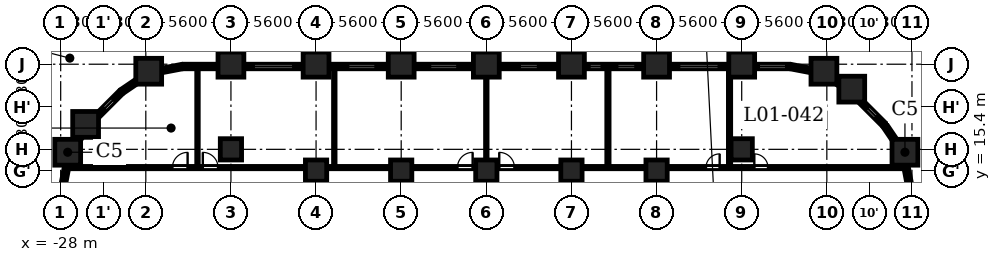
"""IFC4 building model, lengths in metres.
Left out: names, types, materials, properties, quantities, classifications, styles, units other than length and angle.
Written with IfcOpenShell. Run it as: python <this file> out.ifc"""

import sys

from ifc_helpers import new_model, si_unit, direction, frame, frame_2d, origin, origin_2d, place, context, subcontext, project, spatial, rectangle, extrude, element, fill, save


model = new_model("IFC4")
c1 = context("Model", 3, precision=1e-05, world=origin(), true_north=direction((0.0, 1.0)))
c2 = subcontext(c1, "Body", "Model", "MODEL_VIEW")
j1 = project(units=[si_unit("LENGTHUNIT", "METRE"), si_unit("PLANEANGLEUNIT", "RADIAN")], contexts=[c1])
p1 = place(None, origin())
s1 = spatial("IfcSite", under=j1, at=p1, CompositionType="ELEMENT")
p2 = place(p1, origin())
s2 = spatial("IfcBuilding", under=s1, at=p2, CompositionType="ELEMENT")
p3 = place(p2, frame((0.0, 0.0, 6.5)))
s3 = spatial("IfcBuildingStorey", under=s2, at=p3, CompositionType="ELEMENT", Elevation=6.5)
for number, where, z_axis, x_axis in (
    (1, (27.538, 16.609, 0.0), (0.0, 0.0, 1.0), (1.0, 0.0, 0.0)),
    (2, (24.04, 20.76, 0.0), (0.0, 0.0, 1.0), (1.0, 0.0, 0.0)),
    (3, (22.209, 21.938, 0.0), (0.0, 0.0, 1.0), (1.0, 0.0, 0.0)),
    (4, (16.8, 22.4, 0.0), (0.0, 0.0, 1.0), (1.0, 0.0, 0.0)),
    (5, (11.2, 22.4, 0.0), (0.0, 0.0, 1.0), (1.0, 0.0, 0.0)),
    (6, (5.6, 22.4, 0.0), (0.0, 0.0, 1.0), (1.0, 0.0, 0.0)),
    (7, (0.0, 22.4, 0.0), (0.0, 0.0, 1.0), (1.0, 0.0, 0.0)),
    (8, (-5.6, 22.4, 0.0), (0.0, 0.0, 1.0), (1.0, 0.0, 0.0)),
    (9, (-11.2, 22.4, 0.0), (0.0, 0.0, 1.0), (1.0, 0.0, 0.0)),
    (10, (-16.8, 22.4, 0.0), (0.0, 0.0, 1.0), (1.0, 0.0, 0.0)),
    (11, (-22.209, 21.938, 0.0), (0.0, 0.0, 1.0), (1.0, 0.0, 0.0)),
    (12, (-26.36, 18.44, 0.0), (0.0, 0.0, 1.0), (1.0, 0.0, 0.0)),
    (13, (-27.538, 16.609, 0.0), (0.0, 0.0, 1.0), (1.0, 0.0, 0.0)),
):
    element("IfcColumn", number, at=place(p3, frame(where, z_axis=z_axis, x_axis=x_axis)), inside=s3, PredefinedType="COLUMN", context=c2, shape_type="SweptSolid", body=[
        extrude(rectangle(XDim=1.7, YDim=1.7, at=origin_2d()), origin(), (0.0, 0.0, 1.0), 4.8),
    ])
for number, where, z_axis, x_axis in (
    (14, (-16.8, 16.8, 0.0), (0.0, 0.0, 1.0), (1.0, 0.0, 0.0)),
    (15, (16.8, 16.8, 0.0), (0.0, 0.0, 1.0), (1.0, 0.0, 0.0)),
    (16, (-11.2, 15.4, 0.0), (0.0, 0.0, 1.0), (1.0, 0.0, 0.0)),
    (17, (-5.6, 15.4, 0.0), (0.0, 0.0, 1.0), (1.0, 0.0, 0.0)),
    (18, (0.0, 15.4, 0.0), (0.0, 0.0, 1.0), (1.0, 0.0, 0.0)),
    (19, (5.6, 15.4, 0.0), (0.0, 0.0, 1.0), (1.0, 0.0, 0.0)),
    (20, (11.2, 15.4, 0.0), (0.0, 0.0, 1.0), (1.0, 0.0, 0.0)),
):
    element("IfcColumn", number, at=place(p3, frame(where, z_axis=z_axis, x_axis=x_axis)), inside=s3, PredefinedType="COLUMN", context=c2, shape_type="SweptSolid", body=[
        extrude(rectangle(XDim=1.4, YDim=1.4, at=origin_2d()), origin(), (0.0, 0.0, 1.0), 4.8),
    ])
for number, where, z_axis, x_axis in (
    (21, (27.853, 14.372, 0.0), (0.0, 0.0, 1.0), (-0.187, 0.982, 0.0)),
    (22, (26.969, 17.25, 0.0), (0.0, 0.0, 1.0), (-0.562, 0.827, 0.0)),
):
    element("IfcWall", number, at=place(p3, frame(where, z_axis=z_axis, x_axis=x_axis)), inside=s3, PredefinedType="SOLIDWALL", context=c2, shape_type="SweptSolid", body=[
        extrude(rectangle(XDim=1.406, YDim=0.3, at=frame_2d((0.703, 0.0))), origin(), (0.0, 0.0, 1.0), 3.55),
    ])
p4 = place(p3, frame((26.197, 18.391, 0.0), z_axis=(0.0, 0.0, 1.0), x_axis=(-0.707054835785, 0.707158722772, 0.0)))
e23 = element("IfcWall", 23, at=p4, inside=s3, PredefinedType="SOLIDWALL", context=c2, shape_type="SweptSolid", body=[
    extrude(rectangle(XDim=2.35, YDim=0.3, at=frame_2d((1.175, 0.0))), origin(), (0.0, 0.0, 1.0), 3.55),
])
p5 = place(p4, frame((0.775, 0.0, 0.6)))
e24 = element("IfcOpeningElement", 24, at=p5, cuts=e23, PredefinedType="OPENING", context=c2, shape_type="SweptSolid", body=[
    extrude(rectangle(XDim=0.8, YDim=1.55, at=frame_2d((0.4, 0.775))), frame((0.0, 0.16, 0.0), z_axis=(0.0, -1.0, 0.0), x_axis=(1.0, 0.0, 0.0)), (0.0, 0.0, 1.0), 0.32),
])
p6 = place(p3, frame((23.244, 21.101, 0.0), z_axis=(0.0, 0.0, 1.0), x_axis=(-0.827135885329, 0.562001981492, 0.0)))
e25 = element("IfcWall", 25, at=p6, inside=s3, PredefinedType="SOLIDWALL", context=c2, shape_type="SweptSolid", body=[
    extrude(rectangle(XDim=0.477, YDim=0.3, at=frame_2d((0.239, 0.0))), origin(), (0.0, 0.0, 1.0), 4.45),
])
p7 = place(p3, frame((21.353, 21.989, 0.0), z_axis=(0.0, 0.0, 1.0), x_axis=(-0.98229142023, 0.187359455971, 0.0)))
e26 = element("IfcWall", 26, at=p7, inside=s3, PredefinedType="SOLIDWALL", context=c2, shape_type="SweptSolid", body=[
    extrude(rectangle(XDim=1.406, YDim=0.3, at=frame_2d((0.703, 0.0))), origin(), (0.0, 0.0, 1.0), 3.55),
])
p8 = place(p3, frame((20.0, 22.25, 0.0), z_axis=(0.0, 0.0, 1.0), x_axis=(-1.0, 0.0, 0.0)))
e27 = element("IfcWall", 27, at=p8, inside=s3, PredefinedType="SOLIDWALL", context=c2, shape_type="SweptSolid", body=[
    extrude(rectangle(XDim=2.35, YDim=0.3, at=frame_2d((1.175, 0.0))), origin(), (0.0, 0.0, 1.0), 3.55),
])
p9 = place(p8, frame((0.275, 0.0, 0.9)))
e28 = element("IfcOpeningElement", 28, at=p9, cuts=e27, PredefinedType="OPENING", context=c2, shape_type="SweptSolid", body=[
    extrude(rectangle(XDim=1.8, YDim=1.25, at=frame_2d((0.9, 0.625))), frame((0.0, 0.16, 0.0), z_axis=(0.0, -1.0, 0.0), x_axis=(1.0, 0.0, 0.0)), (0.0, 0.0, 1.0), 0.32),
])
p10 = place(p3, frame((15.95, 22.25, 0.0), z_axis=(0.0, 0.0, 1.0), x_axis=(-1.0, 0.0, 0.0)))
e29 = element("IfcWall", 29, at=p10, inside=s3, PredefinedType="SOLIDWALL", context=c2, shape_type="SweptSolid", body=[
    extrude(rectangle(XDim=3.9, YDim=0.3, at=frame_2d((1.95, 0.0))), origin(), (0.0, 0.0, 1.0), 3.55),
])
p11 = place(p10, frame((0.663, 0.0, 0.9)))
e30 = element("IfcOpeningElement", 30, at=p11, cuts=e29, PredefinedType="OPENING", context=c2, shape_type="SweptSolid", body=[
    extrude(rectangle(XDim=2.6, YDim=1.25, at=frame_2d((1.3, 0.625))), frame((0.0, 0.16, 0.0), z_axis=(0.0, -1.0, 0.0), x_axis=(1.0, 0.0, 0.0)), (0.0, 0.0, 1.0), 0.32),
])
p12 = place(p3, frame((10.35, 22.25, 0.0), z_axis=(0.0, 0.0, 1.0), x_axis=(-1.0, 0.0, 0.0)))
e31 = element("IfcWall", 31, at=p12, inside=s3, PredefinedType="SOLIDWALL", context=c2, shape_type="SweptSolid", body=[
    extrude(rectangle(XDim=3.9, YDim=0.3, at=frame_2d((1.95, 0.0))), origin(), (0.0, 0.0, 1.0), 3.55),
])
p13 = place(p12, frame((0.538, 0.0, 0.6)))
e32 = element("IfcOpeningElement", 32, at=p13, cuts=e31, PredefinedType="OPENING", context=c2, shape_type="SweptSolid", body=[
    extrude(rectangle(XDim=1.2, YDim=1.55, at=frame_2d((0.6, 0.775))), frame((0.0, 0.16, 0.0), z_axis=(0.0, -1.0, 0.0), x_axis=(1.0, 0.0, 0.0)), (0.0, 0.0, 1.0), 0.32),
])
p14 = place(p12, frame((2.762, 0.0, 0.6)))
e33 = element("IfcOpeningElement", 33, at=p14, cuts=e31, PredefinedType="OPENING", context=c2, shape_type="SweptSolid", body=[
    extrude(rectangle(XDim=0.8, YDim=1.55, at=frame_2d((0.4, 0.775))), frame((0.0, 0.16, 0.0), z_axis=(0.0, -1.0, 0.0), x_axis=(1.0, 0.0, 0.0)), (0.0, 0.0, 1.0), 0.32),
])
p15 = place(p3, frame((4.75, 22.25, 0.0), z_axis=(0.0, 0.0, 1.0), x_axis=(-1.0, 0.0, 0.0)))
e34 = element("IfcWall", 34, at=p15, inside=s3, PredefinedType="SOLIDWALL", context=c2, shape_type="SweptSolid", body=[
    extrude(rectangle(XDim=3.9, YDim=0.3, at=frame_2d((1.95, 0.0))), origin(), (0.0, 0.0, 1.0), 3.55),
])
p16 = place(p15, frame((1.35, 0.0, 0.6)))
e35 = element("IfcOpeningElement", 35, at=p16, cuts=e34, PredefinedType="OPENING", context=c2, shape_type="SweptSolid", body=[
    extrude(rectangle(XDim=1.2, YDim=1.55, at=frame_2d((0.6, 0.775))), frame((0.0, 0.16, 0.0), z_axis=(0.0, -1.0, 0.0), x_axis=(1.0, 0.0, 0.0)), (0.0, 0.0, 1.0), 0.32),
])
p17 = place(p3, frame((-0.85, 22.25, 0.0), z_axis=(0.0, 0.0, 1.0), x_axis=(-1.0, 0.0, 0.0)))
e36 = element("IfcWall", 36, at=p17, inside=s3, PredefinedType="SOLIDWALL", context=c2, shape_type="SweptSolid", body=[
    extrude(rectangle(XDim=3.9, YDim=0.3, at=frame_2d((1.95, 0.0))), origin(), (0.0, 0.0, 1.0), 3.55),
])
p18 = place(p17, frame((1.05, 0.0, 0.9)))
e37 = element("IfcOpeningElement", 37, at=p18, cuts=e36, PredefinedType="OPENING", context=c2, shape_type="SweptSolid", body=[
    extrude(rectangle(XDim=1.8, YDim=1.25, at=frame_2d((0.9, 0.625))), frame((0.0, 0.16, 0.0), z_axis=(0.0, -1.0, 0.0), x_axis=(1.0, 0.0, 0.0)), (0.0, 0.0, 1.0), 0.32),
])
p19 = place(p3, frame((-6.45, 22.25, 0.0), z_axis=(0.0, 0.0, 1.0), x_axis=(-1.0, 0.0, 0.0)))
e38 = element("IfcWall", 38, at=p19, inside=s3, PredefinedType="SOLIDWALL", context=c2, shape_type="SweptSolid", body=[
    extrude(rectangle(XDim=3.9, YDim=0.3, at=frame_2d((1.95, 0.0))), origin(), (0.0, 0.0, 1.0), 3.55),
])
p20 = place(p19, frame((0.837, 0.0, 0.9)))
e39 = element("IfcOpeningElement", 39, at=p20, cuts=e38, PredefinedType="OPENING", context=c2, shape_type="SweptSolid", body=[
    extrude(rectangle(XDim=1.8, YDim=1.25, at=frame_2d((0.9, 0.625))), frame((0.0, 0.16, 0.0), z_axis=(0.0, -1.0, 0.0), x_axis=(1.0, 0.0, 0.0)), (0.0, 0.0, 1.0), 0.32),
])
p21 = place(p3, frame((-12.05, 22.25, 0.0), z_axis=(0.0, 0.0, 1.0), x_axis=(-1.0, 0.0, 0.0)))
e40 = element("IfcWall", 40, at=p21, inside=s3, PredefinedType="SOLIDWALL", context=c2, shape_type="SweptSolid", body=[
    extrude(rectangle(XDim=3.9, YDim=0.3, at=frame_2d((1.95, 0.0))), origin(), (0.0, 0.0, 1.0), 3.55),
])
p22 = place(p21, frame((0.65, 0.0, 0.9)))
e41 = element("IfcOpeningElement", 41, at=p22, cuts=e40, PredefinedType="OPENING", context=c2, shape_type="SweptSolid", body=[
    extrude(rectangle(XDim=2.6, YDim=1.25, at=frame_2d((1.3, 0.625))), frame((0.0, 0.16, 0.0), z_axis=(0.0, -1.0, 0.0), x_axis=(1.0, 0.0, 0.0)), (0.0, 0.0, 1.0), 0.32),
])
p23 = place(p3, frame((-17.65, 22.25, 0.0), z_axis=(0.0, 0.0, 1.0), x_axis=(-1.0, 0.0, 0.0)))
e42 = element("IfcWall", 42, at=p23, inside=s3, PredefinedType="SOLIDWALL", context=c2, shape_type="SweptSolid", body=[
    extrude(rectangle(XDim=2.35, YDim=0.3, at=frame_2d((1.175, 0.0))), origin(), (0.0, 0.0, 1.0), 3.55),
])
for number, where, z_axis, x_axis in (
    (43, (-19.972, 22.253, 0.0), (0.0, 0.0, 1.0), (-0.982, -0.187, 0.0)),
    (44, (-22.85, 21.369, 0.0), (0.0, 0.0, 1.0), (-0.827, -0.562, 0.0)),
):
    element("IfcWall", number, at=place(p3, frame(where, z_axis=z_axis, x_axis=x_axis)), inside=s3, PredefinedType="SOLIDWALL", context=c2, shape_type="SweptSolid", body=[
        extrude(rectangle(XDim=1.406, YDim=0.3, at=frame_2d((0.703, 0.0))), origin(), (0.0, 0.0, 1.0), 3.55),
    ])
p24 = place(p3, frame((-23.991, 20.597, 0.0), z_axis=(0.0, 0.0, 1.0), x_axis=(-0.707054835785, -0.707158722772, 0.0)))
e45 = element("IfcWall", 45, at=p24, inside=s3, PredefinedType="SOLIDWALL", context=c2, shape_type="SweptSolid", body=[
    extrude(rectangle(XDim=2.35, YDim=0.3, at=frame_2d((1.175, 0.0))), origin(), (0.0, 0.0, 1.0), 3.55),
])
p25 = place(p24, frame((0.775, 0.0, 0.6)))
e46 = element("IfcOpeningElement", 46, at=p25, cuts=e45, PredefinedType="OPENING", context=c2, shape_type="SweptSolid", body=[
    extrude(rectangle(XDim=0.8, YDim=1.55, at=frame_2d((0.4, 0.775))), frame((0.0, 0.16, 0.0), z_axis=(0.0, -1.0, 0.0), x_axis=(1.0, 0.0, 0.0)), (0.0, 0.0, 1.0), 0.32),
])
p26 = place(p3, frame((-26.701, 17.644, 0.0), z_axis=(0.0, 0.0, 1.0), x_axis=(-0.562001981492, -0.827135885329, 0.0)))
e47 = element("IfcWall", 47, at=p26, inside=s3, PredefinedType="SOLIDWALL", context=c2, shape_type="SweptSolid", body=[
    extrude(rectangle(XDim=0.477, YDim=0.3, at=frame_2d((0.239, 0.0))), origin(), (0.0, 0.0, 1.0), 4.45),
])
p27 = place(p3, frame((-27.589, 15.753, 0.0), z_axis=(0.0, 0.0, 1.0), x_axis=(-0.187327504018, -0.982297514116, 0.0)))
e48 = element("IfcWall", 48, at=p27, inside=s3, PredefinedType="SOLIDWALL", context=c2, shape_type="SweptSolid", body=[
    extrude(rectangle(XDim=1.406, YDim=0.3, at=frame_2d((0.703, 0.0))), origin(), (0.0, 0.0, 1.0), 3.55),
])
p28 = place(p3, frame((-27.446, 15.6, 0.0), z_axis=(0.0, 0.0, 1.0), x_axis=(1.0, 0.0, 0.0)))
e49 = element("IfcWall", 49, at=p28, inside=s3, PredefinedType="PARTITIONING", context=c2, shape_type="SweptSolid", body=[
    extrude(rectangle(XDim=54.892, YDim=0.15, at=frame_2d((27.446, 0.0))), origin(), (0.0, 0.0, 1.0), 4.45),
])
p29 = place(p28, frame((6.796, 0.0, 0.0)))
e50 = element("IfcOpeningElement", 50, at=p29, cuts=e49, PredefinedType="OPENING", context=c2, shape_type="SweptSolid", body=[
    extrude(rectangle(XDim=1.0, YDim=2.1, at=frame_2d((0.5, 1.05))), frame((0.0, 0.085, 0.0), z_axis=(0.0, -1.0, 0.0), x_axis=(1.0, 0.0, 0.0)), (0.0, 0.0, 1.0), 0.17),
])
p30 = place(p28, frame((8.796, 0.0, 0.0)))
e51 = element("IfcOpeningElement", 51, at=p30, cuts=e49, PredefinedType="OPENING", context=c2, shape_type="SweptSolid", body=[
    extrude(rectangle(XDim=1.0, YDim=2.1, at=frame_2d((0.5, 1.05))), frame((0.0, 0.085, 0.0), z_axis=(0.0, -1.0, 0.0), x_axis=(1.0, 0.0, 0.0)), (0.0, 0.0, 1.0), 0.17),
])
p31 = place(p28, frame((25.546, 0.0, 0.0)))
e52 = element("IfcOpeningElement", 52, at=p31, cuts=e49, PredefinedType="OPENING", context=c2, shape_type="SweptSolid", body=[
    extrude(rectangle(XDim=1.0, YDim=2.1, at=frame_2d((0.5, 1.05))), frame((0.0, 0.085, 0.0), z_axis=(0.0, -1.0, 0.0), x_axis=(1.0, 0.0, 0.0)), (0.0, 0.0, 1.0), 0.17),
])
p32 = place(p28, frame((28.296, 0.0, 0.0)))
e53 = element("IfcOpeningElement", 53, at=p32, cuts=e49, PredefinedType="OPENING", context=c2, shape_type="SweptSolid", body=[
    extrude(rectangle(XDim=1.0, YDim=2.1, at=frame_2d((0.5, 1.05))), frame((0.0, 0.085, 0.0), z_axis=(0.0, -1.0, 0.0), x_axis=(1.0, 0.0, 0.0)), (0.0, 0.0, 1.0), 0.17),
])
p33 = place(p28, frame((41.896, 0.0, 0.0)))
e54 = element("IfcOpeningElement", 54, at=p33, cuts=e49, PredefinedType="OPENING", context=c2, shape_type="SweptSolid", body=[
    extrude(rectangle(XDim=0.9, YDim=2.1, at=frame_2d((0.45, 1.05))), frame((0.0, 0.085, 0.0), z_axis=(0.0, -1.0, 0.0), x_axis=(1.0, 0.0, 0.0)), (0.0, 0.0, 1.0), 0.17),
])
p34 = place(p28, frame((45.075, 0.0, 0.0)))
e55 = element("IfcOpeningElement", 55, at=p34, cuts=e49, PredefinedType="OPENING", context=c2, shape_type="SweptSolid", body=[
    extrude(rectangle(XDim=0.9, YDim=2.1, at=frame_2d((0.45, 1.05))), frame((0.0, 0.085, 0.0), z_axis=(0.0, -1.0, 0.0), x_axis=(1.0, 0.0, 0.0)), (0.0, 0.0, 1.0), 0.17),
])
for number, where, z_axis, x_axis in (
    (56, (-19.0, 15.675, 0.0), (0.0, 0.0, 1.0), (0.0, 1.0, 0.0)),
    (57, (-10.0, 15.675, 0.0), (0.0, 0.0, 1.0), (0.0, 1.0, 0.0)),
):
    element("IfcWall", number, at=place(p3, frame(where, z_axis=z_axis, x_axis=x_axis)), inside=s3, PredefinedType="PARTITIONING", context=c2, shape_type="SweptSolid", body=[
        extrude(rectangle(XDim=6.405, YDim=0.1, at=frame_2d((3.203, 0.0))), origin(), (0.0, 0.0, 1.0), 4.45),
    ])
p35 = place(p3, frame((0.0, 15.675, 0.0), z_axis=(0.0, 0.0, 1.0), x_axis=(0.0, 1.0, 0.0)))
e58 = element("IfcWall", 58, at=p35, inside=s3, PredefinedType="PARTITIONING", context=c2, shape_type="SweptSolid", body=[
    extrude(rectangle(XDim=6.635, YDim=0.1, at=frame_2d((3.317, 0.0))), origin(), (0.0, 0.0, 1.0), 4.45),
])
p36 = place(p3, frame((8.0, 15.675, 0.0), z_axis=(0.0, 0.0, 1.0), x_axis=(0.0, 1.0, 0.0)))
e59 = element("IfcWall", 59, at=p36, inside=s3, PredefinedType="PARTITIONING", context=c2, shape_type="SweptSolid", body=[
    extrude(rectangle(XDim=6.405, YDim=0.15, at=frame_2d((3.203, 0.0))), origin(), (0.0, 0.0, 1.0), 4.45),
])
p37 = place(p3, frame((16.0, 15.675, 0.0), z_axis=(0.0, 0.0, 1.0), x_axis=(0.0, 1.0, 0.0)))
e60 = element("IfcWall", 60, at=p37, inside=s3, PredefinedType="PARTITIONING", context=c2, shape_type="SweptSolid", body=[
    extrude(rectangle(XDim=6.635, YDim=0.15, at=frame_2d((3.317, 0.0))), origin(), (0.0, 0.0, 1.0), 4.45),
])
p38 = place(p29, origin())
e61 = element("IfcDoor", 61, at=p38, inside=s3, OperationType="SINGLE_SWING_LEFT", PredefinedType="DOOR", context=c2, shape_type="SweptSolid", body=[
    extrude(rectangle(XDim=1.0, YDim=2.1, at=frame_2d((0.5, 1.05))), frame((0.0, 0.025, 0.0), z_axis=(0.0, -1.0, 0.0), x_axis=(1.0, 0.0, 0.0)), (0.0, 0.0, 1.0), 0.05),
])
fill(e50, e61)
p39 = place(p30, origin())
e62 = element("IfcDoor", 62, at=p39, inside=s3, OperationType="SINGLE_SWING_RIGHT", PredefinedType="DOOR", context=c2, shape_type="SweptSolid", body=[
    extrude(rectangle(XDim=1.0, YDim=2.1, at=frame_2d((0.5, 1.05))), frame((0.0, 0.025, 0.0), z_axis=(0.0, -1.0, 0.0), x_axis=(1.0, 0.0, 0.0)), (0.0, 0.0, 1.0), 0.05),
])
fill(e51, e62)
p40 = place(p31, origin())
e63 = element("IfcDoor", 63, at=p40, inside=s3, OperationType="SINGLE_SWING_LEFT", PredefinedType="DOOR", context=c2, shape_type="SweptSolid", body=[
    extrude(rectangle(XDim=1.0, YDim=2.1, at=frame_2d((0.5, 1.05))), frame((0.0, 0.025, 0.0), z_axis=(0.0, -1.0, 0.0), x_axis=(1.0, 0.0, 0.0)), (0.0, 0.0, 1.0), 0.05),
])
fill(e52, e63)
p41 = place(p32, origin())
e64 = element("IfcDoor", 64, at=p41, inside=s3, OperationType="SINGLE_SWING_RIGHT", PredefinedType="DOOR", context=c2, shape_type="SweptSolid", body=[
    extrude(rectangle(XDim=1.0, YDim=2.1, at=frame_2d((0.5, 1.05))), frame((0.0, 0.025, 0.0), z_axis=(0.0, -1.0, 0.0), x_axis=(1.0, 0.0, 0.0)), (0.0, 0.0, 1.0), 0.05),
])
fill(e53, e64)
p42 = place(p33, origin())
e65 = element("IfcDoor", 65, at=p42, inside=s3, OperationType="SINGLE_SWING_LEFT", PredefinedType="DOOR", context=c2, shape_type="SweptSolid", body=[
    extrude(rectangle(XDim=0.9, YDim=2.1, at=frame_2d((0.45, 1.05))), frame((0.0, 0.025, 0.0), z_axis=(0.0, -1.0, 0.0), x_axis=(1.0, 0.0, 0.0)), (0.0, 0.0, 1.0), 0.05),
])
fill(e54, e65)
p43 = place(p34, origin())
e66 = element("IfcDoor", 66, at=p43, inside=s3, OperationType="SINGLE_SWING_RIGHT", PredefinedType="DOOR", context=c2, shape_type="SweptSolid", body=[
    extrude(rectangle(XDim=0.9, YDim=2.1, at=frame_2d((0.45, 1.05))), frame((0.0, 0.025, 0.0), z_axis=(0.0, -1.0, 0.0), x_axis=(1.0, 0.0, 0.0)), (0.0, 0.0, 1.0), 0.05),
])
fill(e55, e66)
p44 = place(p5, origin())
e67 = element("IfcWindow", 67, at=p44, inside=s3, PartitioningType="SINGLE_PANEL", PredefinedType="WINDOW", context=c2, shape_type="SweptSolid", body=[
    extrude(rectangle(XDim=0.8, YDim=1.55, at=frame_2d((0.4, 0.775))), frame((0.0, 0.03, 0.0), z_axis=(0.0, -1.0, 0.0), x_axis=(1.0, 0.0, 0.0)), (0.0, 0.0, 1.0), 0.06),
])
fill(e24, e67)
p45 = place(p9, origin())
e68 = element("IfcWindow", 68, at=p45, inside=s3, PartitioningType="SINGLE_PANEL", PredefinedType="WINDOW", context=c2, shape_type="SweptSolid", body=[
    extrude(rectangle(XDim=1.8, YDim=1.25, at=frame_2d((0.9, 0.625))), frame((0.0, 0.03, 0.0), z_axis=(0.0, -1.0, 0.0), x_axis=(1.0, 0.0, 0.0)), (0.0, 0.0, 1.0), 0.06),
])
fill(e28, e68)
p46 = place(p11, origin())
e69 = element("IfcWindow", 69, at=p46, inside=s3, PartitioningType="SINGLE_PANEL", PredefinedType="WINDOW", context=c2, shape_type="SweptSolid", body=[
    extrude(rectangle(XDim=2.6, YDim=1.25, at=frame_2d((1.3, 0.625))), frame((0.0, 0.03, 0.0), z_axis=(0.0, -1.0, 0.0), x_axis=(1.0, 0.0, 0.0)), (0.0, 0.0, 1.0), 0.06),
])
fill(e30, e69)
p47 = place(p13, origin())
e70 = element("IfcWindow", 70, at=p47, inside=s3, PartitioningType="SINGLE_PANEL", PredefinedType="WINDOW", context=c2, shape_type="SweptSolid", body=[
    extrude(rectangle(XDim=1.2, YDim=1.55, at=frame_2d((0.6, 0.775))), frame((0.0, 0.03, 0.0), z_axis=(0.0, -1.0, 0.0), x_axis=(1.0, 0.0, 0.0)), (0.0, 0.0, 1.0), 0.06),
])
fill(e32, e70)
p48 = place(p14, origin())
e71 = element("IfcWindow", 71, at=p48, inside=s3, PartitioningType="SINGLE_PANEL", PredefinedType="WINDOW", context=c2, shape_type="SweptSolid", body=[
    extrude(rectangle(XDim=0.8, YDim=1.55, at=frame_2d((0.4, 0.775))), frame((0.0, 0.03, 0.0), z_axis=(0.0, -1.0, 0.0), x_axis=(1.0, 0.0, 0.0)), (0.0, 0.0, 1.0), 0.06),
])
fill(e33, e71)
p49 = place(p16, origin())
e72 = element("IfcWindow", 72, at=p49, inside=s3, PartitioningType="SINGLE_PANEL", PredefinedType="WINDOW", context=c2, shape_type="SweptSolid", body=[
    extrude(rectangle(XDim=1.2, YDim=1.55, at=frame_2d((0.6, 0.775))), frame((0.0, 0.03, 0.0), z_axis=(0.0, -1.0, 0.0), x_axis=(1.0, 0.0, 0.0)), (0.0, 0.0, 1.0), 0.06),
])
fill(e35, e72)
p50 = place(p18, origin())
e73 = element("IfcWindow", 73, at=p50, inside=s3, PartitioningType="SINGLE_PANEL", PredefinedType="WINDOW", context=c2, shape_type="SweptSolid", body=[
    extrude(rectangle(XDim=1.8, YDim=1.25, at=frame_2d((0.9, 0.625))), frame((0.0, 0.03, 0.0), z_axis=(0.0, -1.0, 0.0), x_axis=(1.0, 0.0, 0.0)), (0.0, 0.0, 1.0), 0.06),
])
fill(e37, e73)
p51 = place(p20, origin())
e74 = element("IfcWindow", 74, at=p51, inside=s3, PartitioningType="SINGLE_PANEL", PredefinedType="WINDOW", context=c2, shape_type="SweptSolid", body=[
    extrude(rectangle(XDim=1.8, YDim=1.25, at=frame_2d((0.9, 0.625))), frame((0.0, 0.03, 0.0), z_axis=(0.0, -1.0, 0.0), x_axis=(1.0, 0.0, 0.0)), (0.0, 0.0, 1.0), 0.06),
])
fill(e39, e74)
p52 = place(p22, origin())
e75 = element("IfcWindow", 75, at=p52, inside=s3, PartitioningType="SINGLE_PANEL", PredefinedType="WINDOW", context=c2, shape_type="SweptSolid", body=[
    extrude(rectangle(XDim=2.6, YDim=1.25, at=frame_2d((1.3, 0.625))), frame((0.0, 0.03, 0.0), z_axis=(0.0, -1.0, 0.0), x_axis=(1.0, 0.0, 0.0)), (0.0, 0.0, 1.0), 0.06),
])
fill(e41, e75)
p53 = place(p25, origin())
e76 = element("IfcWindow", 76, at=p53, inside=s3, PartitioningType="SINGLE_PANEL", PredefinedType="WINDOW", context=c2, shape_type="SweptSolid", body=[
    extrude(rectangle(XDim=0.8, YDim=1.55, at=frame_2d((0.4, 0.775))), frame((0.0, 0.03, 0.0), z_axis=(0.0, -1.0, 0.0), x_axis=(1.0, 0.0, 0.0)), (0.0, 0.0, 1.0), 0.06),
])
fill(e46, e76)
save(model, sys.argv[1])
